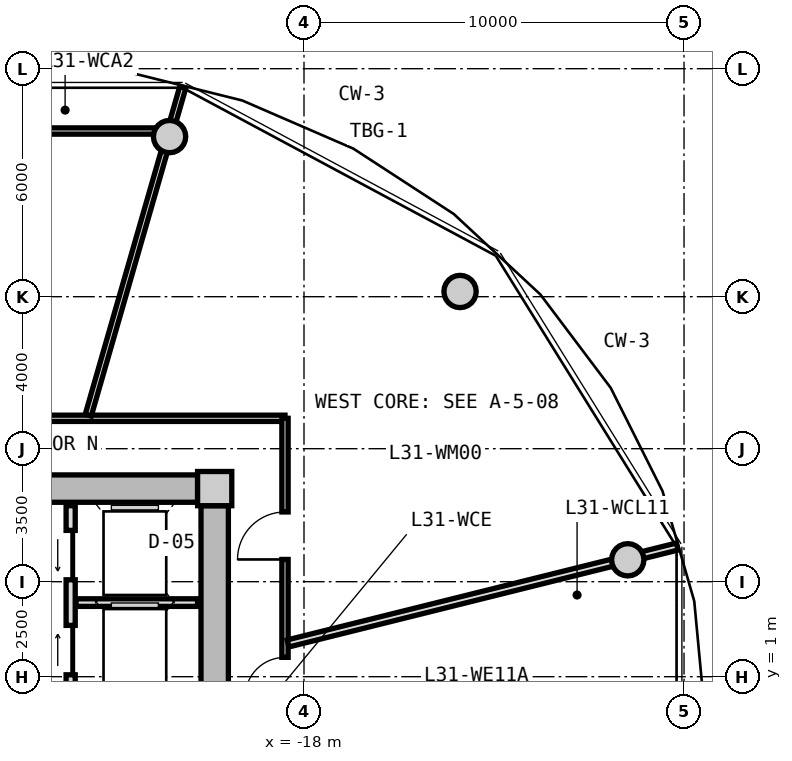
"""IFC4 building model, lengths in metres.
Left out: names, types, materials, properties, quantities, classifications, styles, units other than length and angle.
Written with IfcOpenShell. Run it as: python <this file> out.ifc"""

import sys

from ifc_helpers import new_model, si_unit, direction, frame, frame_2d, origin, origin_2d, place, context, subcontext, project, spatial, rectangle, circle, extrude, source, transform, mapped, element, fill, save


model = new_model("IFC4")
c1 = context("Model", 3, precision=1e-05, world=origin(), true_north=direction((0.0, 1.0)))
c2 = subcontext(c1, "Body", "Model", "MODEL_VIEW")
j1 = project(units=[si_unit("LENGTHUNIT", "METRE"), si_unit("PLANEANGLEUNIT", "RADIAN")], contexts=[c1])
p1 = place(None, origin())
s1 = spatial("IfcSite", under=j1, at=p1, CompositionType="ELEMENT")
p2 = place(p1, origin())
s2 = spatial("IfcBuilding", under=s1, at=p2, CompositionType="ELEMENT")
p3 = place(p2, frame((0.0, 0.0, 102.35)))
s3 = spatial("IfcBuildingStorey", under=s2, at=p3, CompositionType="ELEMENT", Elevation=102.35)
m1 = source(origin(), c2, "Body", "SweptSolid", [
    extrude(rectangle(XDim=0.9, YDim=0.9, at=origin_2d()), origin(), (0.0, 0.0, 1.0), 3.05),
])
p4 = place(p3, frame((-20.35, 5.95, 0.0), z_axis=(0.0, 0.0, 1.0), x_axis=(1.0, 0.0, 0.0)))
e1 = element("IfcColumn", 1, at=p4, inside=s3, PredefinedType="COLUMN", context=c2, shape_type="MappedRepresentation", body=[
    mapped(m1, transform((0.0, 0.0, 0.0), x_axis=(1.0, 0.0, 0.0), y_axis=(0.0, 1.0, 0.0), z_axis=(0.0, 0.0, 1.0), scale=1.0)),
])
m2 = source(origin(), c2, "Body", "SweptSolid", [
    extrude(rectangle(XDim=14.4, YDim=0.72, at=frame_2d((7.2, 0.0))), origin(), (0.0, 0.0, 1.0), 2.79),
])
p5 = place(p3, frame((-35.2, 5.95, 0.0), z_axis=(0.0, 0.0, 1.0), x_axis=(1.0, 0.0, 0.0)))
e2 = element("IfcWall", 2, at=p5, inside=s3, PredefinedType="SHEAR", context=c2, shape_type="MappedRepresentation", body=[
    mapped(m2, transform((0.0, 0.0, 0.0), x_axis=(1.0, 0.0, 0.0), y_axis=(0.0, 1.0, 0.0), z_axis=(0.0, 0.0, 1.0), scale=1.0)),
])
m3 = source(origin(), c2, "Body", "SweptSolid", [
    extrude(rectangle(XDim=11.0, YDim=0.72, at=frame_2d((5.5, 0.0))), origin(), (0.0, 0.0, 1.0), 2.79),
])
p6 = place(p3, frame((-20.35, 5.5, 0.0), z_axis=(0.0, 0.0, 1.0), x_axis=(0.0, -1.0, 0.0)))
e3 = element("IfcWall", 3, at=p6, inside=s3, PredefinedType="SHEAR", context=c2, shape_type="MappedRepresentation", body=[
    mapped(m3, transform((0.0, 0.0, 0.0), x_axis=(1.0, 0.0, 0.0), y_axis=(0.0, 1.0, 0.0), z_axis=(0.0, 0.0, 1.0), scale=1.0)),
])
p7 = place(p6, frame((5.65, 0.0, 0.0)))
e4 = element("IfcOpeningElement", 4, at=p7, cuts=e3, PredefinedType="OPENING", context=c2, shape_type="SweptSolid", body=[
    extrude(rectangle(XDim=1.2, YDim=2.15, at=frame_2d((0.6, 1.075))), frame((0.0, 0.37, 0.0), z_axis=(0.0, -1.0, 0.0), x_axis=(1.0, 0.0, 0.0)), (0.0, 0.0, 1.0), 0.74),
])
m4 = source(origin(), c2, "Body", "SweptSolid", [
    extrude(circle(Radius=0.425, at=origin_2d()), origin(), (0.0, 0.0, 1.0), 3.05),
])
for number, where, z_axis, x_axis in (
    (5, (-9.481, 4.076, 0.0), (0.0, 0.0, 1.0), (1.0, 0.0, 0.0)),
    (6, (-13.894, 11.137, 0.0), (0.0, 0.0, 1.0), (1.0, 0.0, 0.0)),
    (7, (-21.537, 15.213, 0.0), (0.0, 0.0, 1.0), (1.0, 0.0, 0.0)),
):
    element("IfcColumn", number, at=place(p3, frame(where, z_axis=z_axis, x_axis=x_axis)), inside=s3, PredefinedType="COLUMN", context=c2, shape_type="MappedRepresentation", body=[
        mapped(m4, transform((0.0, 0.0, 0.0), x_axis=(1.0, 0.0, 0.0), y_axis=(0.0, 1.0, 0.0), z_axis=(0.0, 0.0, 1.0), scale=1.0)),
    ])
m5 = source(origin(), c2, "Body", "SweptSolid", [
    extrude(rectangle(XDim=5.0, YDim=0.24, at=frame_2d((2.5, 0.0))), origin(), (0.0, 0.0, 1.0), 2.775),
])
p8 = place(p3, frame((-24.14, 0.5, 0.0), z_axis=(0.0, 0.0, 1.0), x_axis=(0.0, 1.0, 0.0)))
e8 = element("IfcWall", 8, at=p8, inside=s3, PredefinedType="PARTITIONING", context=c2, shape_type="MappedRepresentation", body=[
    mapped(m5, transform((0.0, 0.0, 0.0), x_axis=(1.0, 0.0, 0.0), y_axis=(0.0, 1.0, 0.0), z_axis=(0.0, 0.0, 1.0), scale=1.0)),
])
p9 = place(p8, frame((3.05, 0.0, 0.0)))
e9 = element("IfcOpeningElement", 9, at=p9, cuts=e8, PredefinedType="OPENING", context=c2, shape_type="SweptSolid", body=[
    extrude(rectangle(XDim=1.3, YDim=2.2, at=frame_2d((0.65, 1.1))), frame((0.0, 0.13, 0.0), z_axis=(0.0, -1.0, 0.0), x_axis=(1.0, 0.0, 0.0)), (0.0, 0.0, 1.0), 0.26),
])
p10 = place(p8, frame((0.55, 0.0, 0.0)))
e10 = element("IfcOpeningElement", 10, at=p10, cuts=e8, PredefinedType="OPENING", context=c2, shape_type="SweptSolid", body=[
    extrude(rectangle(XDim=1.3, YDim=2.2, at=frame_2d((0.65, 1.1))), frame((0.0, 0.13, 0.0), z_axis=(0.0, -1.0, 0.0), x_axis=(1.0, 0.0, 0.0)), (0.0, 0.0, 1.0), 0.26),
])
m6 = source(origin(), c2, "Body", "SweptSolid", [
    extrude(rectangle(XDim=3.2, YDim=0.2, at=frame_2d((1.6, 0.0))), origin(), (0.0, 0.0, 1.0), 2.775),
])
p11 = place(p3, frame((-24.0, 2.95, 0.0), z_axis=(0.0, 0.0, 1.0), x_axis=(1.0, 0.0, 0.0)))
e11 = element("IfcWall", 11, at=p11, inside=s3, PredefinedType="PARTITIONING", context=c2, shape_type="MappedRepresentation", body=[
    mapped(m6, transform((0.0, 0.0, 0.0), x_axis=(1.0, 0.0, 0.0), y_axis=(0.0, 1.0, 0.0), z_axis=(0.0, 0.0, 1.0), scale=1.0)),
])
m7 = source(origin(), c2, "Body", "SweptSolid", [
    extrude(rectangle(XDim=8.6, YDim=0.165, at=frame_2d((4.3, 0.0))), origin(), (0.0, 0.0, 1.0), 2.775),
])
p12 = place(p3, frame((-27.1, 7.8, 0.0), z_axis=(0.0, 0.0, 1.0), x_axis=(1.0, 0.0, 0.0)))
e12 = element("IfcWall", 12, at=p12, inside=s3, PredefinedType="PARTITIONING", context=c2, shape_type="MappedRepresentation", body=[
    mapped(m7, transform((0.0, 0.0, 0.0), x_axis=(1.0, 0.0, 0.0), y_axis=(0.0, 1.0, 0.0), z_axis=(0.0, 0.0, 1.0), scale=1.0)),
])
m8 = source(origin(), c2, "Body", "SweptSolid", [
    extrude(rectangle(XDim=15.6, YDim=0.165, at=frame_2d((7.8, 0.0))), origin(), (0.0, 0.0, 1.0), 2.775),
])
p13 = place(p3, frame((-18.5, 7.8, 0.0), z_axis=(0.0, 0.0, 1.0), x_axis=(0.0, -1.0, 0.0)))
e13 = element("IfcWall", 13, at=p13, inside=s3, PredefinedType="PARTITIONING", context=c2, shape_type="MappedRepresentation", body=[
    mapped(m8, transform((0.0, 0.0, 0.0), x_axis=(1.0, 0.0, 0.0), y_axis=(0.0, 1.0, 0.0), z_axis=(0.0, 0.0, 1.0), scale=1.0)),
])
p14 = place(p13, frame((12.002, 0.0, 0.0)))
e14 = element("IfcOpeningElement", 14, at=p14, cuts=e13, PredefinedType="OPENING", context=c2, shape_type="SweptSolid", body=[
    extrude(rectangle(XDim=1.05, YDim=2.15, at=frame_2d((0.525, 1.075))), frame((0.0, 0.093, 0.0), z_axis=(0.0, -1.0, 0.0), x_axis=(1.0, 0.0, 0.0)), (0.0, 0.0, 1.0), 0.185),
])
p15 = place(p13, frame((10.211, 0.0, 0.0)))
e15 = element("IfcOpeningElement", 15, at=p15, cuts=e13, PredefinedType="OPENING", context=c2, shape_type="SweptSolid", body=[
    extrude(rectangle(XDim=1.05, YDim=2.15, at=frame_2d((0.525, 1.075))), frame((0.0, 0.093, 0.0), z_axis=(0.0, -1.0, 0.0), x_axis=(1.0, 0.0, 0.0)), (0.0, 0.0, 1.0), 0.185),
])
p16 = place(p13, frame((7.722, 0.0, 0.0)))
e16 = element("IfcOpeningElement", 16, at=p16, cuts=e13, PredefinedType="OPENING", context=c2, shape_type="SweptSolid", body=[
    extrude(rectangle(XDim=1.05, YDim=2.15, at=frame_2d((0.525, 1.075))), frame((0.0, 0.093, 0.0), z_axis=(0.0, -1.0, 0.0), x_axis=(1.0, 0.0, 0.0)), (0.0, 0.0, 1.0), 0.185),
])
p17 = place(p13, frame((6.291, 0.0, 0.0)))
e17 = element("IfcOpeningElement", 17, at=p17, cuts=e13, PredefinedType="OPENING", context=c2, shape_type="SweptSolid", body=[
    extrude(rectangle(XDim=1.05, YDim=2.15, at=frame_2d((0.525, 1.075))), frame((0.0, 0.093, 0.0), z_axis=(0.0, -1.0, 0.0), x_axis=(1.0, 0.0, 0.0)), (0.0, 0.0, 1.0), 0.185),
])
p18 = place(p13, frame((2.465, 0.0, 0.0)))
e18 = element("IfcOpeningElement", 18, at=p18, cuts=e13, PredefinedType="OPENING", context=c2, shape_type="SweptSolid", body=[
    extrude(rectangle(XDim=1.25, YDim=2.2, at=frame_2d((0.625, 1.1))), frame((0.0, 0.093, 0.0), z_axis=(0.0, -1.0, 0.0), x_axis=(1.0, 0.0, 0.0)), (0.0, 0.0, 1.0), 0.185),
])
m9 = source(origin(), c2, "Body", "SweptSolid", [
    extrude(rectangle(XDim=8.989, YDim=0.165, at=frame_2d((4.495, 0.0))), origin(), (0.0, 0.0, 1.0), 2.275),
])
p19 = place(p3, frame((-23.678, 7.88, 0.0), z_axis=(0.0, 0.0, 1.0), x_axis=(0.27702323008, 0.960863221274, 0.0)))
e19 = element("IfcWall", 19, at=p19, inside=s3, PredefinedType="PARTITIONING", context=c2, shape_type="MappedRepresentation", body=[
    mapped(m9, transform((0.0, 0.0, 0.0), x_axis=(1.0, 0.0, 0.0), y_axis=(0.0, 1.0, 0.0), z_axis=(0.0, 0.0, 1.0), scale=1.0)),
])
m10 = source(origin(), c2, "Body", "SweptSolid", [
    extrude(rectangle(XDim=5.814, YDim=0.165, at=frame_2d((2.907, 0.0))), origin(), (0.0, 0.0, 1.0), 2.275),
])
p20 = place(p3, frame((-27.18, 15.36, 0.0), z_axis=(0.0, 0.0, 1.0), x_axis=(1.0, 0.0, 0.0)))
e20 = element("IfcWall", 20, at=p20, inside=s3, PredefinedType="PARTITIONING", context=c2, shape_type="MappedRepresentation", body=[
    mapped(m10, transform((0.0, 0.0, 0.0), x_axis=(1.0, 0.0, 0.0), y_axis=(0.0, 1.0, 0.0), z_axis=(0.0, 0.0, 1.0), scale=1.0)),
])
m11 = source(origin(), c2, "Body", "SweptSolid", [
    extrude(rectangle(XDim=10.556, YDim=0.19, at=frame_2d((5.278, 0.0))), origin(), (0.0, 0.0, 1.0), 2.275),
])
p21 = place(p3, frame((-18.42, 1.875, 0.0), z_axis=(0.0, 0.0, 1.0), x_axis=(0.970363857851, 0.241648470667, 0.0)))
e21 = element("IfcWall", 21, at=p21, inside=s3, PredefinedType="PARTITIONING", context=c2, shape_type="MappedRepresentation", body=[
    mapped(m11, transform((0.0, 0.0, 0.0), x_axis=(1.0, 0.0, 0.0), y_axis=(0.0, 1.0, 0.0), z_axis=(0.0, 0.0, 1.0), scale=1.0)),
])
m12 = source(origin(), c2, "Body", "SweptSolid", [
    extrude(rectangle(XDim=1.3, YDim=2.2, at=frame_2d((0.65, 1.1))), frame((0.0, 0.025, 0.0), z_axis=(0.0, -1.0, 0.0), x_axis=(1.0, 0.0, 0.0)), (0.0, 0.0, 1.0), 0.05),
])
p22 = place(p9, origin())
e22 = element("IfcDoor", 22, at=p22, inside=s3, OperationType="SLIDING_TO_LEFT", PredefinedType="DOOR", context=c2, shape_type="MappedRepresentation", body=[
    mapped(m12, transform((0.0, 0.0, 0.0), x_axis=(1.0, 0.0, 0.0), y_axis=(0.0, 1.0, 0.0), z_axis=(0.0, 0.0, 1.0), scale=1.0)),
])
fill(e9, e22)
p23 = place(p10, origin())
e23 = element("IfcDoor", 23, at=p23, inside=s3, OperationType="SLIDING_TO_RIGHT", PredefinedType="DOOR", context=c2, shape_type="MappedRepresentation", body=[
    mapped(m12, transform((0.0, 0.0, 0.0), x_axis=(1.0, 0.0, 0.0), y_axis=(0.0, 1.0, 0.0), z_axis=(0.0, 0.0, 1.0), scale=1.0)),
])
fill(e10, e23)
m13 = source(origin(), c2, "Body", "SweptSolid", [
    extrude(rectangle(XDim=1.05, YDim=2.15, at=frame_2d((0.525, 1.075))), frame((0.0, 0.025, 0.0), z_axis=(0.0, -1.0, 0.0), x_axis=(1.0, 0.0, 0.0)), (0.0, 0.0, 1.0), 0.05),
])
p24 = place(p17, frame((1.05, 0.0, 0.0), z_axis=(0.0, 0.0, 1.0), x_axis=(-1.0, 0.0, 0.0)))
e24 = element("IfcDoor", 24, at=p24, inside=s3, OperationType="SINGLE_SWING_LEFT", PredefinedType="DOOR", context=c2, shape_type="MappedRepresentation", body=[
    mapped(m13, transform((0.0, 0.0, 0.0), x_axis=(1.0, 0.0, 0.0), y_axis=(0.0, 1.0, 0.0), z_axis=(0.0, 0.0, 1.0), scale=1.0)),
])
fill(e17, e24)
m14 = source(origin(), c2, "Body", "SweptSolid", [
    extrude(rectangle(XDim=1.25, YDim=2.2, at=frame_2d((0.625, 1.1))), frame((0.0, 0.025, 0.0), z_axis=(0.0, -1.0, 0.0), x_axis=(1.0, 0.0, 0.0)), (0.0, 0.0, 1.0), 0.05),
])
p25 = place(p18, frame((1.25, 0.0, 0.0), z_axis=(0.0, 0.0, 1.0), x_axis=(-1.0, 0.0, 0.0)))
e25 = element("IfcDoor", 25, at=p25, inside=s3, OperationType="SINGLE_SWING_LEFT", PredefinedType="DOOR", context=c2, shape_type="MappedRepresentation", body=[
    mapped(m14, transform((0.0, 0.0, 0.0), x_axis=(1.0, 0.0, 0.0), y_axis=(0.0, 1.0, 0.0), z_axis=(0.0, 0.0, 1.0), scale=1.0)),
])
fill(e18, e25)
save(model, sys.argv[1])
